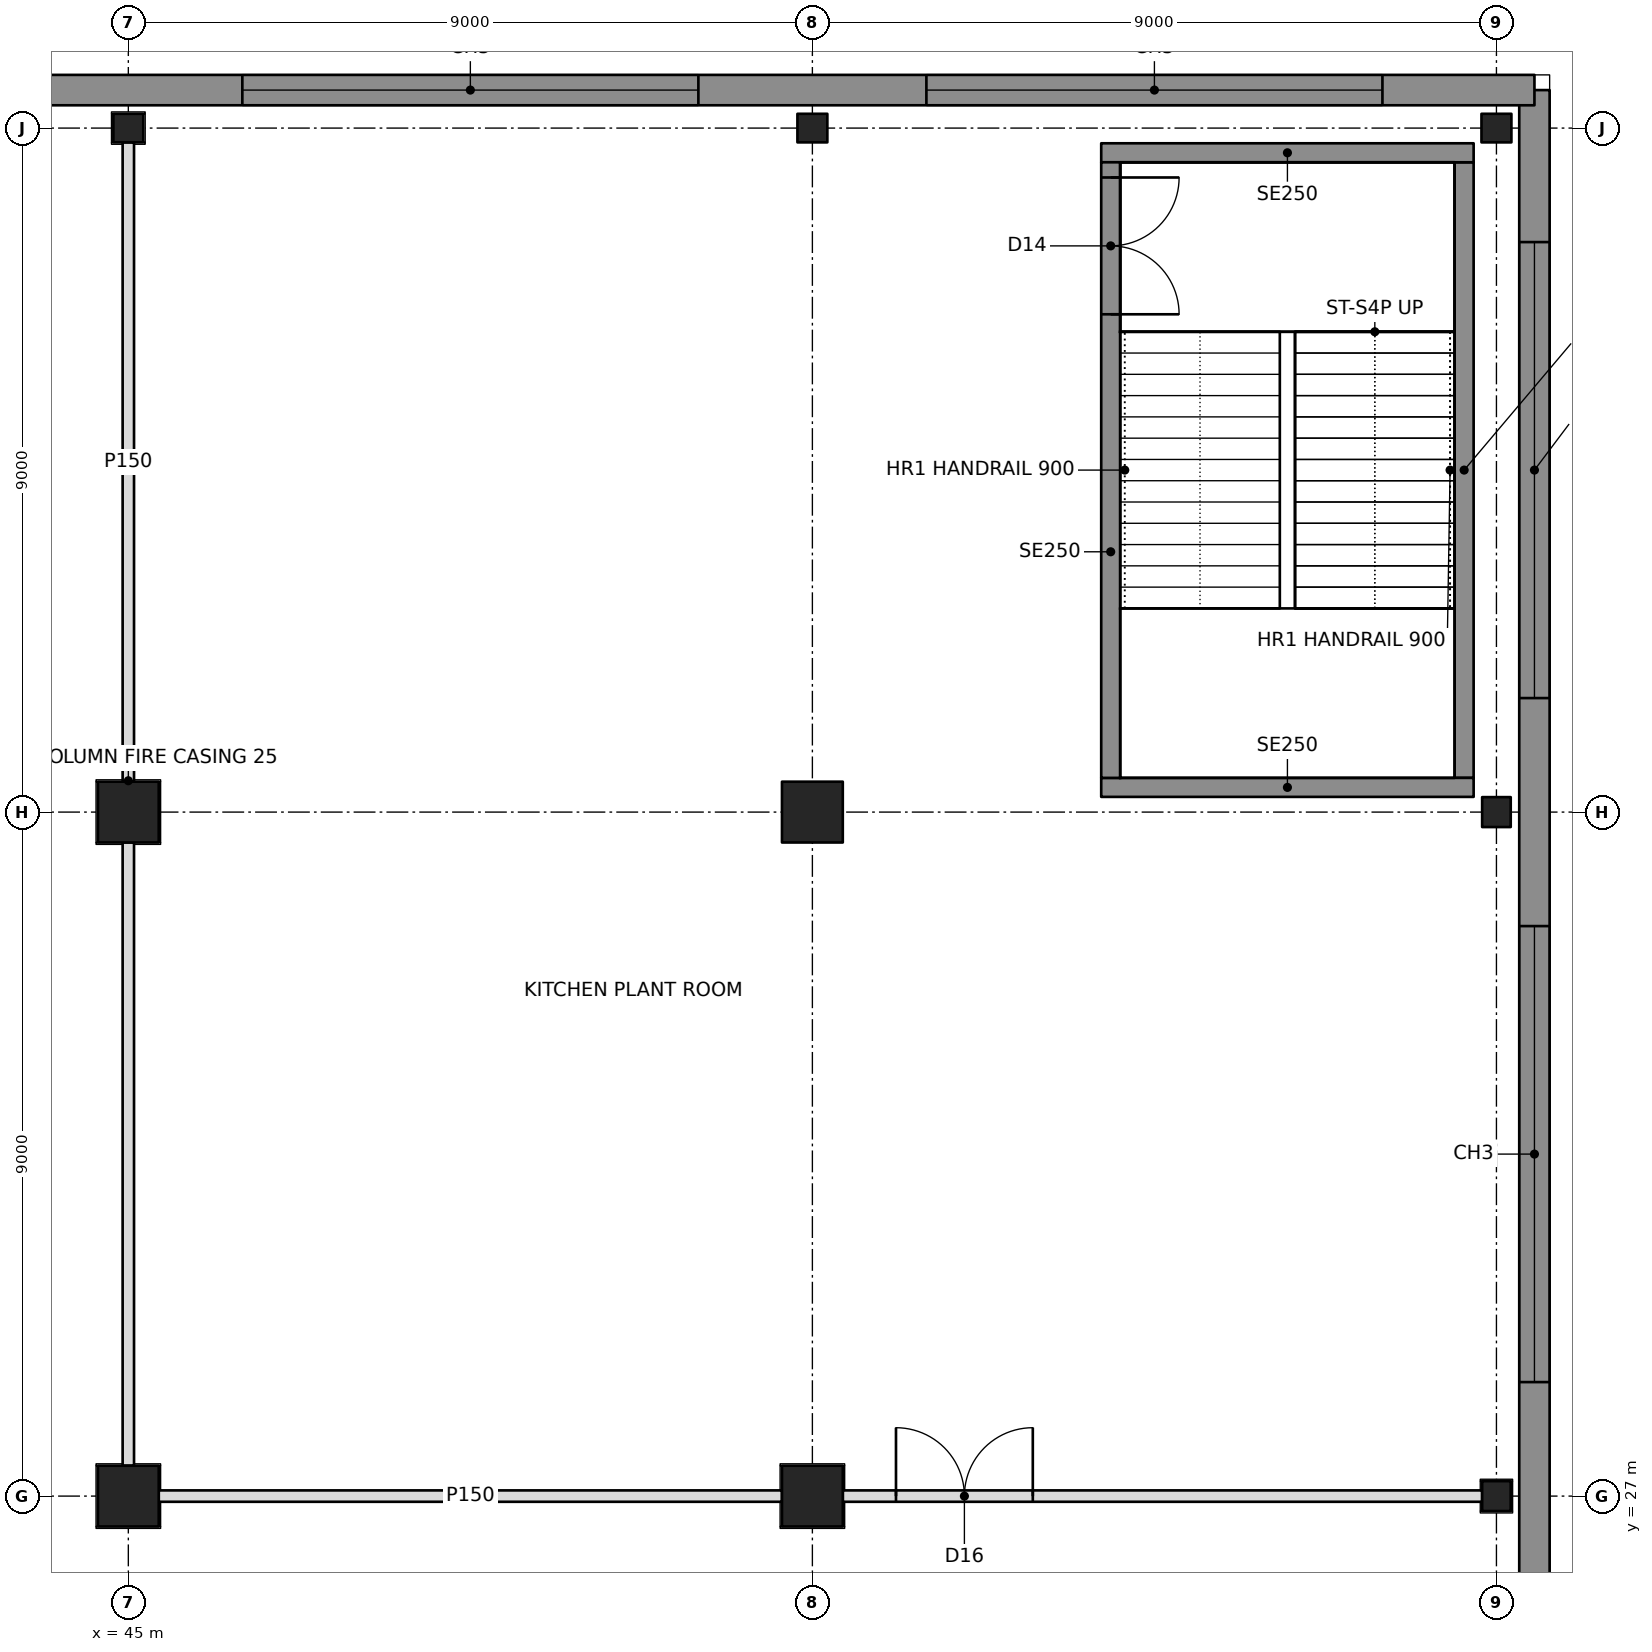
"""IFC4 building model, lengths in metres.
Left out: names, types, materials, properties, quantities, classifications, styles, units other than length and angle.
Written with IfcOpenShell. Run it as: python <this file> out.ifc"""

import sys

from ifc_helpers import new_model, si_unit, direction, frame, frame_2d, origin, origin_2d, place, context, subcontext, project, spatial, rectangle, hollow_rectangle, i_section, extrude, element, fill, save


model = new_model("IFC4")
c1 = context("Model", 3, precision=1e-05, world=origin(), true_north=direction((0.0, 1.0)))
c2 = subcontext(c1, "Body", "Model", "MODEL_VIEW")
j1 = project(units=[si_unit("LENGTHUNIT", "METRE"), si_unit("PLANEANGLEUNIT", "RADIAN")], contexts=[c1])
p1 = place(None, origin())
s1 = spatial("IfcSite", under=j1, at=p1, CompositionType="ELEMENT")
p2 = place(p1, origin())
s2 = spatial("IfcBuilding", under=s1, at=p2, CompositionType="ELEMENT")
p3 = place(p2, frame((0.0, 0.0, 16.0)))
s3 = spatial("IfcBuildingStorey", under=s2, at=p3, CompositionType="ELEMENT", Elevation=16.0)
for number, where, z_axis, x_axis in (
    (1, (45.0, 27.0, 0.0), (0.0, 0.0, 1.0), (0.0, 1.0, 0.0)),
    (2, (45.0, 36.0, 0.0), (0.0, 0.0, 1.0), (1.0, 0.0, 0.0)),
):
    element("IfcColumn", number, at=place(p3, frame(where, z_axis=z_axis, x_axis=x_axis)), inside=s3, PredefinedType="COLUMN", context=c2, shape_type="SweptSolid", body=[
        extrude(hollow_rectangle(XDim=0.8, YDim=0.8, WallThickness=0.1, at=origin_2d()), origin(), (0.0, 0.0, 1.0), 7.0),
    ])
p4 = place(p3, frame((45.0, 45.0, 0.0), z_axis=(0.0, 0.0, 1.0), x_axis=(1.0, 0.0, 0.0)))
e3 = element("IfcColumn", 3, at=p4, inside=s3, PredefinedType="COLUMN", context=c2, shape_type="SweptSolid", body=[
    extrude(i_section(OverallWidth=0.394, OverallDepth=0.376, WebThickness=0.017, FlangeThickness=0.028, at=origin_2d()), origin(), (0.0, 0.0, 1.0), 7.0),
])
for number, where, z_axis, x_axis in (
    (4, (54.0, 27.0, 0.0), (0.0, 0.0, 1.0), (0.0, 1.0, 0.0)),
    (5, (54.0, 36.0, 0.0), (0.0, 0.0, 1.0), (1.0, 0.0, 0.0)),
):
    element("IfcColumn", number, at=place(p3, frame(where, z_axis=z_axis, x_axis=x_axis)), inside=s3, PredefinedType="COLUMN", context=c2, shape_type="SweptSolid", body=[
        extrude(hollow_rectangle(XDim=0.8, YDim=0.8, WallThickness=0.1, at=origin_2d()), origin(), (0.0, 0.0, 1.0), 7.0),
    ])
for number, where, z_axis, x_axis in (
    (6, (54.0, 45.0, 0.0), (0.0, 0.0, 1.0), (1.0, 0.0, 0.0)),
    (7, (63.0, 27.0, 0.0), (0.0, 0.0, 1.0), (0.0, 1.0, 0.0)),
    (8, (63.0, 36.0, 0.0), (0.0, 0.0, 1.0), (0.0, 1.0, 0.0)),
    (9, (63.0, 45.0, 0.0), (0.0, 0.0, 1.0), (1.0, 0.0, 0.0)),
):
    element("IfcColumn", number, at=place(p3, frame(where, z_axis=z_axis, x_axis=x_axis)), inside=s3, PredefinedType="COLUMN", context=c2, shape_type="SweptSolid", body=[
        extrude(i_section(OverallWidth=0.394, OverallDepth=0.376, WebThickness=0.017, FlangeThickness=0.028, at=origin_2d()), origin(), (0.0, 0.0, 1.0), 7.0),
    ])
p5 = place(p3, frame((63.5, -27.5, 0.0), z_axis=(0.0, 0.0, 1.0), x_axis=(0.0, 1.0, 0.0)))
e10 = element("IfcWall", 10, at=p5, inside=s3, PredefinedType="SOLIDWALL", context=c2, shape_type="SweptSolid", body=[
    extrude(rectangle(XDim=73.0, YDim=0.4, at=frame_2d((36.5, 0.0))), origin(), (0.0, 0.0, 1.0), 6.7),
])
p6 = place(p5, frame((2.0, 0.0, 0.9)))
e11 = element("IfcOpeningElement", 11, at=p6, cuts=e10, PredefinedType="OPENING", context=c2, shape_type="SweptSolid", body=[
    extrude(rectangle(XDim=6.0, YDim=2.6, at=frame_2d((3.0, 1.3))), frame((0.0, 0.21, 0.0), z_axis=(0.0, -1.0, 0.0), x_axis=(1.0, 0.0, 0.0)), (0.0, 0.0, 1.0), 0.42),
])
p7 = place(p5, frame((11.0, 0.0, 0.9)))
e12 = element("IfcOpeningElement", 12, at=p7, cuts=e10, PredefinedType="OPENING", context=c2, shape_type="SweptSolid", body=[
    extrude(rectangle(XDim=6.0, YDim=2.6, at=frame_2d((3.0, 1.3))), frame((0.0, 0.21, 0.0), z_axis=(0.0, -1.0, 0.0), x_axis=(1.0, 0.0, 0.0)), (0.0, 0.0, 1.0), 0.42),
])
p8 = place(p5, frame((20.0, 0.0, 0.9)))
e13 = element("IfcOpeningElement", 13, at=p8, cuts=e10, PredefinedType="OPENING", context=c2, shape_type="SweptSolid", body=[
    extrude(rectangle(XDim=6.0, YDim=2.6, at=frame_2d((3.0, 1.3))), frame((0.0, 0.21, 0.0), z_axis=(0.0, -1.0, 0.0), x_axis=(1.0, 0.0, 0.0)), (0.0, 0.0, 1.0), 0.42),
])
p9 = place(p5, frame((29.0, 0.0, 0.9)))
e14 = element("IfcOpeningElement", 14, at=p9, cuts=e10, PredefinedType="OPENING", context=c2, shape_type="SweptSolid", body=[
    extrude(rectangle(XDim=6.0, YDim=2.6, at=frame_2d((3.0, 1.3))), frame((0.0, 0.21, 0.0), z_axis=(0.0, -1.0, 0.0), x_axis=(1.0, 0.0, 0.0)), (0.0, 0.0, 1.0), 0.42),
])
p10 = place(p5, frame((38.0, 0.0, 0.9)))
e15 = element("IfcOpeningElement", 15, at=p10, cuts=e10, PredefinedType="OPENING", context=c2, shape_type="SweptSolid", body=[
    extrude(rectangle(XDim=6.0, YDim=2.6, at=frame_2d((3.0, 1.3))), frame((0.0, 0.21, 0.0), z_axis=(0.0, -1.0, 0.0), x_axis=(1.0, 0.0, 0.0)), (0.0, 0.0, 1.0), 0.42),
])
p11 = place(p5, frame((47.0, 0.0, 0.9)))
e16 = element("IfcOpeningElement", 16, at=p11, cuts=e10, PredefinedType="OPENING", context=c2, shape_type="SweptSolid", body=[
    extrude(rectangle(XDim=6.0, YDim=2.6, at=frame_2d((3.0, 1.3))), frame((0.0, 0.21, 0.0), z_axis=(0.0, -1.0, 0.0), x_axis=(1.0, 0.0, 0.0)), (0.0, 0.0, 1.0), 0.42),
])
p12 = place(p5, frame((56.0, 0.0, 0.9)))
e17 = element("IfcOpeningElement", 17, at=p12, cuts=e10, PredefinedType="OPENING", context=c2, shape_type="SweptSolid", body=[
    extrude(rectangle(XDim=6.0, YDim=2.6, at=frame_2d((3.0, 1.3))), frame((0.0, 0.21, 0.0), z_axis=(0.0, -1.0, 0.0), x_axis=(1.0, 0.0, 0.0)), (0.0, 0.0, 1.0), 0.42),
])
p13 = place(p5, frame((65.0, 0.0, 0.9)))
e18 = element("IfcOpeningElement", 18, at=p13, cuts=e10, PredefinedType="OPENING", context=c2, shape_type="SweptSolid", body=[
    extrude(rectangle(XDim=6.0, YDim=2.6, at=frame_2d((3.0, 1.3))), frame((0.0, 0.21, 0.0), z_axis=(0.0, -1.0, 0.0), x_axis=(1.0, 0.0, 0.0)), (0.0, 0.0, 1.0), 0.42),
])
p14 = place(p3, frame((63.5, 45.5, 0.0), z_axis=(0.0, 0.0, 1.0), x_axis=(-1.0, 0.0, 0.0)))
e19 = element("IfcWall", 19, at=p14, inside=s3, PredefinedType="SOLIDWALL", context=c2, shape_type="SweptSolid", body=[
    extrude(rectangle(XDim=73.0, YDim=0.4, at=frame_2d((36.5, 0.0))), origin(), (0.0, 0.0, 1.0), 6.7),
])
p15 = place(p14, frame((2.0, 0.0, 0.9)))
e20 = element("IfcOpeningElement", 20, at=p15, cuts=e19, PredefinedType="OPENING", context=c2, shape_type="SweptSolid", body=[
    extrude(rectangle(XDim=6.0, YDim=2.6, at=frame_2d((3.0, 1.3))), frame((0.0, 0.21, 0.0), z_axis=(0.0, -1.0, 0.0), x_axis=(1.0, 0.0, 0.0)), (0.0, 0.0, 1.0), 0.42),
])
p16 = place(p14, frame((11.0, 0.0, 0.9)))
e21 = element("IfcOpeningElement", 21, at=p16, cuts=e19, PredefinedType="OPENING", context=c2, shape_type="SweptSolid", body=[
    extrude(rectangle(XDim=6.0, YDim=2.6, at=frame_2d((3.0, 1.3))), frame((0.0, 0.21, 0.0), z_axis=(0.0, -1.0, 0.0), x_axis=(1.0, 0.0, 0.0)), (0.0, 0.0, 1.0), 0.42),
])
p17 = place(p14, frame((20.0, 0.0, 0.9)))
e22 = element("IfcOpeningElement", 22, at=p17, cuts=e19, PredefinedType="OPENING", context=c2, shape_type="SweptSolid", body=[
    extrude(rectangle(XDim=6.0, YDim=2.6, at=frame_2d((3.0, 1.3))), frame((0.0, 0.21, 0.0), z_axis=(0.0, -1.0, 0.0), x_axis=(1.0, 0.0, 0.0)), (0.0, 0.0, 1.0), 0.42),
])
p18 = place(p14, frame((29.0, 0.0, 0.9)))
e23 = element("IfcOpeningElement", 23, at=p18, cuts=e19, PredefinedType="OPENING", context=c2, shape_type="SweptSolid", body=[
    extrude(rectangle(XDim=6.0, YDim=2.6, at=frame_2d((3.0, 1.3))), frame((0.0, 0.21, 0.0), z_axis=(0.0, -1.0, 0.0), x_axis=(1.0, 0.0, 0.0)), (0.0, 0.0, 1.0), 0.42),
])
p19 = place(p14, frame((38.0, 0.0, 0.9)))
e24 = element("IfcOpeningElement", 24, at=p19, cuts=e19, PredefinedType="OPENING", context=c2, shape_type="SweptSolid", body=[
    extrude(rectangle(XDim=6.0, YDim=2.6, at=frame_2d((3.0, 1.3))), frame((0.0, 0.21, 0.0), z_axis=(0.0, -1.0, 0.0), x_axis=(1.0, 0.0, 0.0)), (0.0, 0.0, 1.0), 0.42),
])
p20 = place(p14, frame((47.0, 0.0, 0.9)))
e25 = element("IfcOpeningElement", 25, at=p20, cuts=e19, PredefinedType="OPENING", context=c2, shape_type="SweptSolid", body=[
    extrude(rectangle(XDim=6.0, YDim=2.6, at=frame_2d((3.0, 1.3))), frame((0.0, 0.21, 0.0), z_axis=(0.0, -1.0, 0.0), x_axis=(1.0, 0.0, 0.0)), (0.0, 0.0, 1.0), 0.42),
])
p21 = place(p14, frame((56.0, 0.0, 0.9)))
e26 = element("IfcOpeningElement", 26, at=p21, cuts=e19, PredefinedType="OPENING", context=c2, shape_type="SweptSolid", body=[
    extrude(rectangle(XDim=6.0, YDim=2.6, at=frame_2d((3.0, 1.3))), frame((0.0, 0.21, 0.0), z_axis=(0.0, -1.0, 0.0), x_axis=(1.0, 0.0, 0.0)), (0.0, 0.0, 1.0), 0.42),
])
p22 = place(p14, frame((65.0, 0.0, 0.9)))
e27 = element("IfcOpeningElement", 27, at=p22, cuts=e19, PredefinedType="OPENING", context=c2, shape_type="SweptSolid", body=[
    extrude(rectangle(XDim=6.0, YDim=2.6, at=frame_2d((3.0, 1.3))), frame((0.0, 0.21, 0.0), z_axis=(0.0, -1.0, 0.0), x_axis=(1.0, 0.0, 0.0)), (0.0, 0.0, 1.0), 0.42),
])
p23 = place(p3, frame((62.812, 27.0, 0.0), z_axis=(0.0, 0.0, 1.0), x_axis=(-1.0, 0.0, 0.0)))
e28 = element("IfcWall", 28, at=p23, inside=s3, PredefinedType="PARTITIONING", context=c2, shape_type="SweptSolid", body=[
    extrude(rectangle(XDim=8.412, YDim=0.15, at=frame_2d((4.206, 0.0))), origin(), (0.0, 0.0, 1.0), 5.753),
])
p24 = place(p23, frame((5.912, 0.0, 0.0)))
e29 = element("IfcOpeningElement", 29, at=p24, cuts=e28, PredefinedType="OPENING", context=c2, shape_type="SweptSolid", body=[
    extrude(rectangle(XDim=1.8, YDim=2.4, at=frame_2d((0.9, 1.2))), frame((0.0, 0.085, 0.0), z_axis=(0.0, -1.0, 0.0), x_axis=(1.0, 0.0, 0.0)), (0.0, 0.0, 1.0), 0.17),
])
for number, where, z_axis, x_axis in (
    (30, (53.6, 27.0, 0.0), (0.0, 0.0, 1.0), (-1.0, 0.0, 0.0)),
    (31, (45.0, 27.4, 0.0), (0.0, 0.0, 1.0), (0.0, 1.0, 0.0)),
):
    element("IfcWall", number, at=place(p3, frame(where, z_axis=z_axis, x_axis=x_axis)), inside=s3, PredefinedType="PARTITIONING", context=c2, shape_type="SweptSolid", body=[
        extrude(rectangle(XDim=8.2, YDim=0.15, at=frame_2d((4.1, 0.0))), origin(), (0.0, 0.0, 1.0), 5.753),
    ])
p25 = place(p3, frame((45.0, 36.4, 0.0), z_axis=(0.0, 0.0, 1.0), x_axis=(0.0, 1.0, 0.0)))
e32 = element("IfcWall", 32, at=p25, inside=s3, PredefinedType="PARTITIONING", context=c2, shape_type="SweptSolid", body=[
    extrude(rectangle(XDim=8.412, YDim=0.15, at=frame_2d((4.206, 0.0))), origin(), (0.0, 0.0, 1.0), 5.753),
])
for number, where, z_axis, x_axis in (
    (33, (57.8, 36.325, 0.0), (0.0, 0.0, 1.0), (1.0, 0.0, 0.0)),
    (34, (57.8, 44.675, 0.0), (0.0, 0.0, 1.0), (1.0, 0.0, 0.0)),
):
    element("IfcWall", number, at=place(p3, frame(where, z_axis=z_axis, x_axis=x_axis)), inside=s3, PredefinedType="SOLIDWALL", context=c2, shape_type="SweptSolid", body=[
        extrude(rectangle(XDim=4.9, YDim=0.25, at=frame_2d((2.45, 0.0))), origin(), (0.0, 0.0, 1.0), 6.7),
    ])
p26 = place(p3, frame((57.925, 36.45, 0.0), z_axis=(0.0, 0.0, 1.0), x_axis=(0.0, 1.0, 0.0)))
e35 = element("IfcWall", 35, at=p26, inside=s3, PredefinedType="SOLIDWALL", context=c2, shape_type="SweptSolid", body=[
    extrude(rectangle(XDim=8.1, YDim=0.25, at=frame_2d((4.05, 0.0))), origin(), (0.0, 0.0, 1.0), 6.7),
])
p27 = place(p26, frame((6.1, 0.0, 0.0)))
e36 = element("IfcOpeningElement", 36, at=p27, cuts=e35, PredefinedType="OPENING", context=c2, shape_type="SweptSolid", body=[
    extrude(rectangle(XDim=1.8, YDim=2.1, at=frame_2d((0.9, 1.05))), frame((0.0, 0.135, 0.0), z_axis=(0.0, -1.0, 0.0), x_axis=(1.0, 0.0, 0.0)), (0.0, 0.0, 1.0), 0.27),
])
p28 = place(p3, frame((62.575, 36.45, 0.0), z_axis=(0.0, 0.0, 1.0), x_axis=(0.0, 1.0, 0.0)))
e37 = element("IfcWall", 37, at=p28, inside=s3, PredefinedType="SOLIDWALL", context=c2, shape_type="SweptSolid", body=[
    extrude(rectangle(XDim=8.1, YDim=0.25, at=frame_2d((4.05, 0.0))), origin(), (0.0, 0.0, 1.0), 6.7),
])
p29 = place(p12, origin())
e38 = element("IfcWindow", 38, at=p29, inside=s3, PartitioningType="TRIPLE_PANEL_VERTICAL", PredefinedType="WINDOW", context=c2, shape_type="SweptSolid", body=[
    extrude(rectangle(XDim=6.0, YDim=2.6, at=frame_2d((3.0, 1.3))), frame((0.0, 0.03, 0.0), z_axis=(0.0, -1.0, 0.0), x_axis=(1.0, 0.0, 0.0)), (0.0, 0.0, 1.0), 0.06),
])
fill(e17, e38)
p30 = place(p13, origin())
e39 = element("IfcWindow", 39, at=p30, inside=s3, PartitioningType="TRIPLE_PANEL_VERTICAL", PredefinedType="WINDOW", context=c2, shape_type="SweptSolid", body=[
    extrude(rectangle(XDim=6.0, YDim=2.6, at=frame_2d((3.0, 1.3))), frame((0.0, 0.03, 0.0), z_axis=(0.0, -1.0, 0.0), x_axis=(1.0, 0.0, 0.0)), (0.0, 0.0, 1.0), 0.06),
])
fill(e18, e39)
p31 = place(p15, origin())
e40 = element("IfcWindow", 40, at=p31, inside=s3, PartitioningType="TRIPLE_PANEL_VERTICAL", PredefinedType="WINDOW", context=c2, shape_type="SweptSolid", body=[
    extrude(rectangle(XDim=6.0, YDim=2.6, at=frame_2d((3.0, 1.3))), frame((0.0, 0.03, 0.0), z_axis=(0.0, -1.0, 0.0), x_axis=(1.0, 0.0, 0.0)), (0.0, 0.0, 1.0), 0.06),
])
fill(e20, e40)
p32 = place(p16, origin())
e41 = element("IfcWindow", 41, at=p32, inside=s3, PartitioningType="TRIPLE_PANEL_VERTICAL", PredefinedType="WINDOW", context=c2, shape_type="SweptSolid", body=[
    extrude(rectangle(XDim=6.0, YDim=2.6, at=frame_2d((3.0, 1.3))), frame((0.0, 0.03, 0.0), z_axis=(0.0, -1.0, 0.0), x_axis=(1.0, 0.0, 0.0)), (0.0, 0.0, 1.0), 0.06),
])
fill(e21, e41)
p33 = place(p24, frame((1.8, 0.0, 0.0), z_axis=(0.0, 0.0, 1.0), x_axis=(-1.0, 0.0, 0.0)))
e42 = element("IfcDoor", 42, at=p33, inside=s3, OperationType="DOUBLE_DOOR_SINGLE_SWING", PredefinedType="DOOR", context=c2, shape_type="SweptSolid", body=[
    extrude(rectangle(XDim=1.8, YDim=2.4, at=frame_2d((0.9, 1.2))), frame((0.0, 0.025, 0.0), z_axis=(0.0, -1.0, 0.0), x_axis=(1.0, 0.0, 0.0)), (0.0, 0.0, 1.0), 0.05),
])
fill(e29, e42)
p34 = place(p27, frame((1.8, 0.0, 0.0), z_axis=(0.0, 0.0, 1.0), x_axis=(-1.0, 0.0, 0.0)))
e43 = element("IfcDoor", 43, at=p34, inside=s3, OperationType="DOUBLE_DOOR_SINGLE_SWING", PredefinedType="DOOR", context=c2, shape_type="SweptSolid", body=[
    extrude(rectangle(XDim=1.8, YDim=2.1, at=frame_2d((0.9, 1.05))), frame((0.0, 0.025, 0.0), z_axis=(0.0, -1.0, 0.0), x_axis=(1.0, 0.0, 0.0)), (0.0, 0.0, 1.0), 0.05),
])
fill(e36, e43)
save(model, sys.argv[1])
